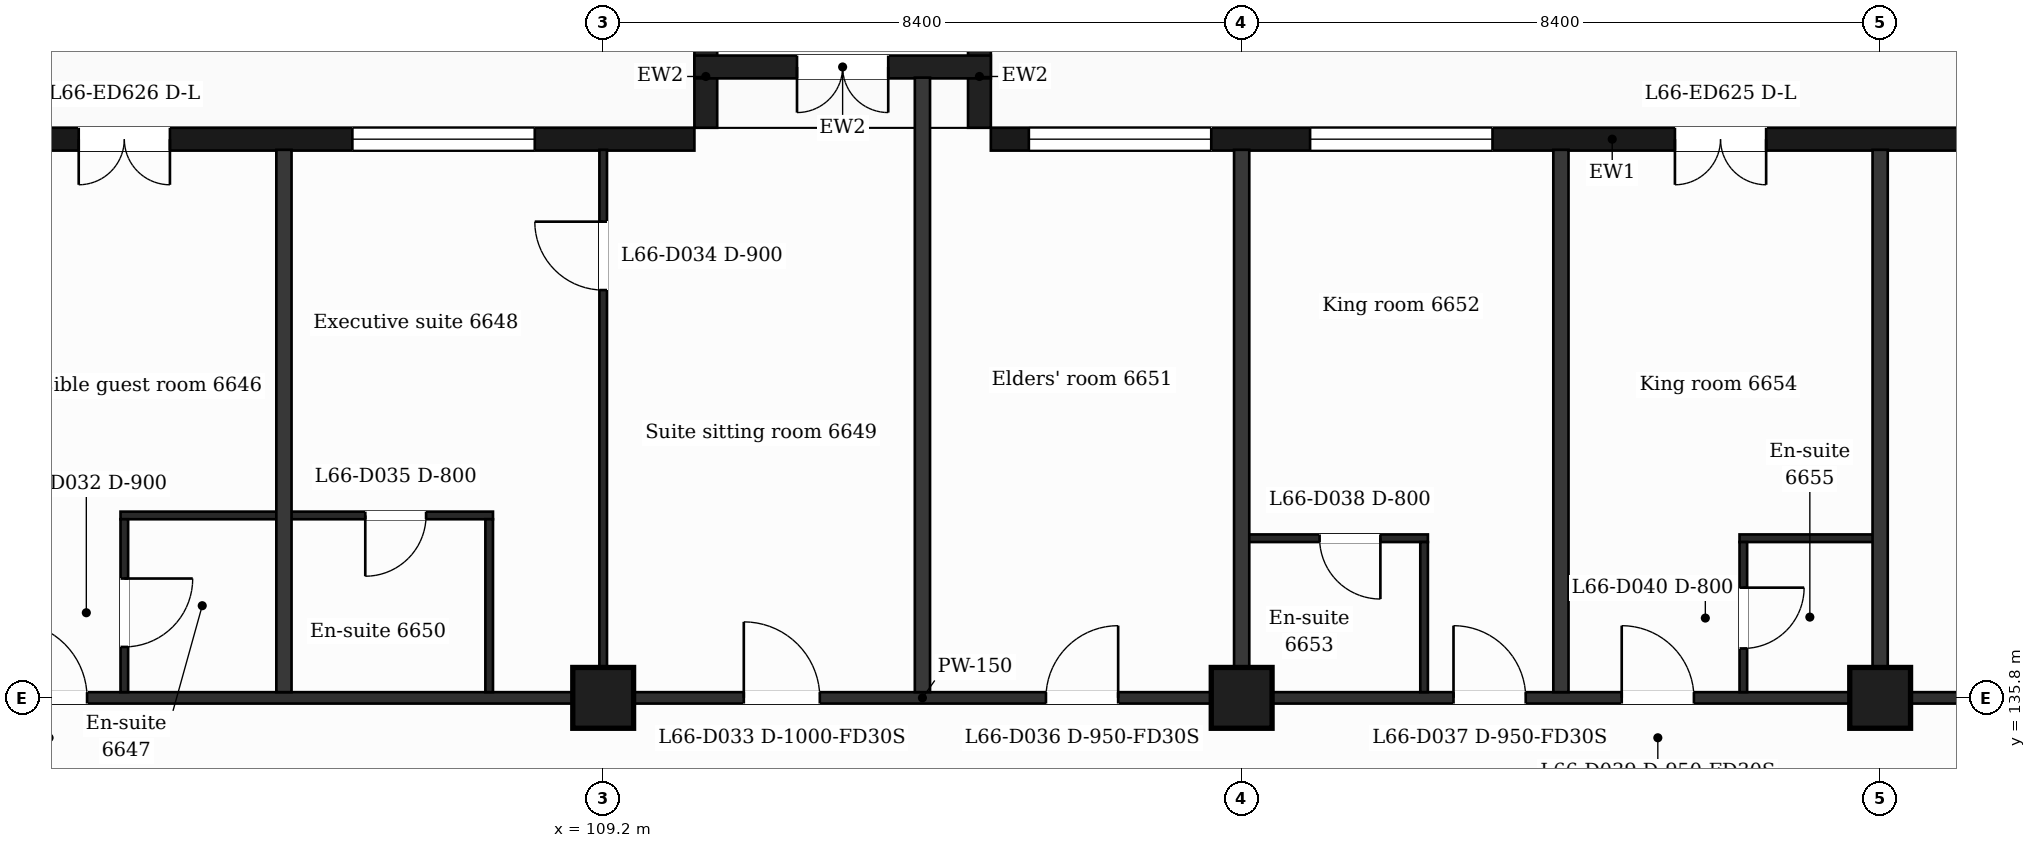
"""IFC4 building model, lengths in metres.
Left out: names, types, materials, properties, quantities, classifications, styles, units other than length and angle.
Written with IfcOpenShell. Run it as: python <this file> out.ifc"""

import sys

from ifc_helpers import new_model, si_unit, direction, frame, frame_2d, origin, origin_2d, place, context, subcontext, project, spatial, rectangle, extrude, element, fill, save


model = new_model("IFC4")
c1 = context("Model", 3, precision=1e-05, world=origin(), true_north=direction((0.0, 1.0)))
c2 = subcontext(c1, "Body", "Model", "MODEL_VIEW")
j1 = project(units=[si_unit("LENGTHUNIT", "METRE"), si_unit("PLANEANGLEUNIT", "RADIAN")], contexts=[c1])
p1 = place(None, origin())
s1 = spatial("IfcSite", under=j1, at=p1, CompositionType="ELEMENT")
p2 = place(p1, origin())
s2 = spatial("IfcBuilding", under=s1, at=p2, CompositionType="ELEMENT")
p3 = place(p2, frame((0.0, 0.0, 273.8)))
s3 = spatial("IfcBuildingStorey", under=s2, at=p3, CompositionType="ELEMENT", Elevation=273.8)
for number, where, z_axis, x_axis in (
    (1, (109.2, 135.8, 0.0), (0.0, 0.0, 1.0), (1.0, 0.0, 0.0)),
    (2, (117.6, 135.8, 0.0), (0.0, 0.0, 1.0), (1.0, 0.0, 0.0)),
    (3, (126.0, 135.8, 0.0), (0.0, 0.0, 1.0), (1.0, 0.0, 0.0)),
):
    element("IfcColumn", number, at=place(p3, frame(where, z_axis=z_axis, x_axis=x_axis)), inside=s3, PredefinedType="COLUMN", context=c2, shape_type="SweptSolid", body=[
        extrude(rectangle(XDim=0.8, YDim=0.8, at=origin_2d()), origin(), (0.0, 0.0, 1.0), 3.7),
    ])
p4 = place(p3, frame((130.65, 143.15, 0.0), z_axis=(0.0, 0.0, 1.0), x_axis=(-1.0, 0.0, 0.0)))
e4 = element("IfcWall", 4, at=p4, inside=s3, PredefinedType="SOLIDWALL", context=c2, shape_type="SweptSolid", body=[
    extrude(rectangle(XDim=16.35, YDim=0.3, at=frame_2d((8.175, 0.0))), origin(), (0.0, 0.0, 1.0), 3.38),
])
p5 = place(p4, frame((1.95, 0.0, 0.9)))
e5 = element("IfcOpeningElement", 5, at=p5, cuts=e4, PredefinedType="OPENING", context=c2, shape_type="SweptSolid", body=[
    extrude(rectangle(XDim=1.2, YDim=2.1, at=frame_2d((0.6, 1.05))), frame((0.0, 0.16, 0.0), z_axis=(0.0, -1.0, 0.0), x_axis=(1.0, 0.0, 0.0)), (0.0, 0.0, 1.0), 0.32),
])
p6 = place(p4, frame((6.15, 0.0, 0.0)))
e6 = element("IfcOpeningElement", 6, at=p6, cuts=e4, PredefinedType="OPENING", context=c2, shape_type="SweptSolid", body=[
    extrude(rectangle(XDim=1.2, YDim=2.4, at=frame_2d((0.6, 1.2))), frame((0.0, 0.16, 0.0), z_axis=(0.0, -1.0, 0.0), x_axis=(1.0, 0.0, 0.0)), (0.0, 0.0, 1.0), 0.32),
])
p7 = place(p4, frame((9.75, 0.0, 0.9)))
e7 = element("IfcOpeningElement", 7, at=p7, cuts=e4, PredefinedType="OPENING", context=c2, shape_type="SweptSolid", body=[
    extrude(rectangle(XDim=2.4, YDim=2.1, at=frame_2d((1.2, 1.05))), frame((0.0, 0.16, 0.0), z_axis=(0.0, -1.0, 0.0), x_axis=(1.0, 0.0, 0.0)), (0.0, 0.0, 1.0), 0.32),
])
p8 = place(p4, frame((13.45, 0.0, 0.9)))
e8 = element("IfcOpeningElement", 8, at=p8, cuts=e4, PredefinedType="OPENING", context=c2, shape_type="SweptSolid", body=[
    extrude(rectangle(XDim=2.4, YDim=2.1, at=frame_2d((1.2, 1.05))), frame((0.0, 0.16, 0.0), z_axis=(0.0, -1.0, 0.0), x_axis=(1.0, 0.0, 0.0)), (0.0, 0.0, 1.0), 0.32),
])
p9 = place(p3, frame((110.4, 143.15, 0.0), z_axis=(0.0, 0.0, 1.0), x_axis=(-1.0, 0.0, 0.0)))
e9 = element("IfcWall", 9, at=p9, inside=s3, PredefinedType="SOLIDWALL", context=c2, shape_type="SweptSolid", body=[
    extrude(rectangle(XDim=14.4, YDim=0.3, at=frame_2d((7.2, 0.0))), origin(), (0.0, 0.0, 1.0), 3.38),
])
p10 = place(p9, frame((2.1, 0.0, 0.9)))
e10 = element("IfcOpeningElement", 10, at=p10, cuts=e9, PredefinedType="OPENING", context=c2, shape_type="SweptSolid", body=[
    extrude(rectangle(XDim=2.4, YDim=2.1, at=frame_2d((1.2, 1.05))), frame((0.0, 0.16, 0.0), z_axis=(0.0, -1.0, 0.0), x_axis=(1.0, 0.0, 0.0)), (0.0, 0.0, 1.0), 0.32),
])
p11 = place(p9, frame((6.9, 0.0, 0.0)))
e11 = element("IfcOpeningElement", 11, at=p11, cuts=e9, PredefinedType="OPENING", context=c2, shape_type="SweptSolid", body=[
    extrude(rectangle(XDim=1.2, YDim=2.4, at=frame_2d((0.6, 1.2))), frame((0.0, 0.16, 0.0), z_axis=(0.0, -1.0, 0.0), x_axis=(1.0, 0.0, 0.0)), (0.0, 0.0, 1.0), 0.32),
])
p12 = place(p9, frame((11.1, 0.0, 0.9)))
e12 = element("IfcOpeningElement", 12, at=p12, cuts=e9, PredefinedType="OPENING", context=c2, shape_type="SweptSolid", body=[
    extrude(rectangle(XDim=1.2, YDim=2.1, at=frame_2d((0.6, 1.05))), frame((0.0, 0.16, 0.0), z_axis=(0.0, -1.0, 0.0), x_axis=(1.0, 0.0, 0.0)), (0.0, 0.0, 1.0), 0.32),
])
for number, where, z_axis, x_axis in (
    (13, (114.15, 143.3, 0.0), (0.0, 0.0, 1.0), (0.0, 1.0, 0.0)),
    (14, (110.55, 143.3, 0.0), (0.0, 0.0, 1.0), (0.0, 1.0, 0.0)),
):
    element("IfcWall", number, at=place(p3, frame(where, z_axis=z_axis, x_axis=x_axis)), inside=s3, PredefinedType="SOLIDWALL", context=c2, shape_type="SweptSolid", body=[
        extrude(rectangle(XDim=1.35, YDim=0.3, at=frame_2d((0.675, 0.0))), origin(), (0.0, 0.0, 1.0), 3.38),
    ])
p13 = place(p3, frame((114.3, 144.1, 0.0), z_axis=(0.0, 0.0, 1.0), x_axis=(-1.0, 0.0, 0.0)))
e15 = element("IfcWall", 15, at=p13, inside=s3, PredefinedType="SOLIDWALL", context=c2, shape_type="SweptSolid", body=[
    extrude(rectangle(XDim=3.9, YDim=0.3, at=frame_2d((1.95, 0.0))), origin(), (0.0, 0.0, 1.0), 3.38),
])
p14 = place(p13, frame((1.35, 0.0, 0.0)))
e16 = element("IfcOpeningElement", 16, at=p14, cuts=e15, PredefinedType="OPENING", context=c2, shape_type="SweptSolid", body=[
    extrude(rectangle(XDim=1.2, YDim=2.4, at=frame_2d((0.6, 1.2))), frame((0.0, 0.16, 0.0), z_axis=(0.0, -1.0, 0.0), x_axis=(1.0, 0.0, 0.0)), (0.0, 0.0, 1.0), 0.32),
])
p15 = place(p3, frame((90.895, 135.8, 0.0), z_axis=(0.0, 0.0, 1.0), x_axis=(1.0, 0.0, 0.0)))
e17 = element("IfcWall", 17, at=p15, inside=s3, PredefinedType="PARTITIONING", context=c2, shape_type="SweptSolid", body=[
    extrude(rectangle(XDim=45.011, YDim=0.15, at=frame_2d((22.505, 0.0))), origin(), (0.0, 0.0, 1.0), 3.38),
])
p16 = place(p15, frame((8.005, 0.0, 0.0)))
e18 = element("IfcOpeningElement", 18, at=p16, cuts=e17, PredefinedType="OPENING", context=c2, shape_type="SweptSolid", body=[
    extrude(rectangle(XDim=1.0, YDim=2.1, at=frame_2d((0.5, 1.05))), frame((0.0, 0.085, 0.0), z_axis=(0.0, -1.0, 0.0), x_axis=(1.0, 0.0, 0.0)), (0.0, 0.0, 1.0), 0.17),
])
p17 = place(p15, frame((10.515, 0.0, 0.0)))
e19 = element("IfcOpeningElement", 19, at=p17, cuts=e17, PredefinedType="OPENING", context=c2, shape_type="SweptSolid", body=[
    extrude(rectangle(XDim=1.0, YDim=2.1, at=frame_2d((0.5, 1.05))), frame((0.0, 0.085, 0.0), z_axis=(0.0, -1.0, 0.0), x_axis=(1.0, 0.0, 0.0)), (0.0, 0.0, 1.0), 0.17),
])
p18 = place(p15, frame((20.156, 0.0, 0.0)))
e20 = element("IfcOpeningElement", 20, at=p18, cuts=e17, PredefinedType="OPENING", context=c2, shape_type="SweptSolid", body=[
    extrude(rectangle(XDim=1.0, YDim=2.1, at=frame_2d((0.5, 1.05))), frame((0.0, 0.085, 0.0), z_axis=(0.0, -1.0, 0.0), x_axis=(1.0, 0.0, 0.0)), (0.0, 0.0, 1.0), 0.17),
])
p19 = place(p15, frame((24.13, 0.0, 0.0)))
e21 = element("IfcOpeningElement", 21, at=p19, cuts=e17, PredefinedType="OPENING", context=c2, shape_type="SweptSolid", body=[
    extrude(rectangle(XDim=0.95, YDim=2.1, at=frame_2d((0.475, 1.05))), frame((0.0, 0.085, 0.0), z_axis=(0.0, -1.0, 0.0), x_axis=(1.0, 0.0, 0.0)), (0.0, 0.0, 1.0), 0.17),
])
p20 = place(p15, frame((29.492, 0.0, 0.0)))
e22 = element("IfcOpeningElement", 22, at=p20, cuts=e17, PredefinedType="OPENING", context=c2, shape_type="SweptSolid", body=[
    extrude(rectangle(XDim=0.95, YDim=2.1, at=frame_2d((0.475, 1.05))), frame((0.0, 0.085, 0.0), z_axis=(0.0, -1.0, 0.0), x_axis=(1.0, 0.0, 0.0)), (0.0, 0.0, 1.0), 0.17),
])
p21 = place(p15, frame((31.705, 0.0, 0.0)))
e23 = element("IfcOpeningElement", 23, at=p21, cuts=e17, PredefinedType="OPENING", context=c2, shape_type="SweptSolid", body=[
    extrude(rectangle(XDim=0.95, YDim=2.1, at=frame_2d((0.475, 1.05))), frame((0.0, 0.085, 0.0), z_axis=(0.0, -1.0, 0.0), x_axis=(1.0, 0.0, 0.0)), (0.0, 0.0, 1.0), 0.17),
])
p22 = place(p15, frame((39.814, 0.0, 0.0)))
e24 = element("IfcOpeningElement", 24, at=p22, cuts=e17, PredefinedType="OPENING", context=c2, shape_type="SweptSolid", body=[
    extrude(rectangle(XDim=0.95, YDim=2.1, at=frame_2d((0.475, 1.05))), frame((0.0, 0.085, 0.0), z_axis=(0.0, -1.0, 0.0), x_axis=(1.0, 0.0, 0.0)), (0.0, 0.0, 1.0), 0.17),
])
p23 = place(p3, frame((117.6, 137.9, 0.0), z_axis=(0.0, 0.0, 1.0), x_axis=(1.0, 0.0, 0.0)))
e25 = element("IfcWall", 25, at=p23, inside=s3, PredefinedType="PARTITIONING", context=c2, shape_type="SweptSolid", body=[
    extrude(rectangle(XDim=2.45, YDim=0.1, at=frame_2d((1.225, 0.0))), origin(), (0.0, 0.0, 1.0), 3.38),
])
p24 = place(p23, frame((1.025, 0.0, 0.0)))
e26 = element("IfcOpeningElement", 26, at=p24, cuts=e25, PredefinedType="OPENING", context=c2, shape_type="SweptSolid", body=[
    extrude(rectangle(XDim=0.8, YDim=2.1, at=frame_2d((0.4, 1.05))), frame((0.0, 0.06, 0.0), z_axis=(0.0, -1.0, 0.0), x_axis=(1.0, 0.0, 0.0)), (0.0, 0.0, 1.0), 0.12),
])
p25 = place(p3, frame((124.15, 137.9, 0.0), z_axis=(0.0, 0.0, 1.0), x_axis=(1.0, 0.0, 0.0)))
e27 = element("IfcWall", 27, at=p25, inside=s3, PredefinedType="PARTITIONING", context=c2, shape_type="SweptSolid", body=[
    extrude(rectangle(XDim=1.85, YDim=0.1, at=frame_2d((0.925, 0.0))), origin(), (0.0, 0.0, 1.0), 3.38),
])
p26 = place(p3, frame((102.85, 138.2, 0.0), z_axis=(0.0, 0.0, 1.0), x_axis=(1.0, 0.0, 0.0)))
e28 = element("IfcWall", 28, at=p26, inside=s3, PredefinedType="PARTITIONING", context=c2, shape_type="SweptSolid", body=[
    extrude(rectangle(XDim=4.9, YDim=0.1, at=frame_2d((2.45, 0.0))), origin(), (0.0, 0.0, 1.0), 3.38),
])
p27 = place(p26, frame((3.22, 0.0, 0.0)))
e29 = element("IfcOpeningElement", 29, at=p27, cuts=e28, PredefinedType="OPENING", context=c2, shape_type="SweptSolid", body=[
    extrude(rectangle(XDim=0.8, YDim=2.1, at=frame_2d((0.4, 1.05))), frame((0.0, 0.06, 0.0), z_axis=(0.0, -1.0, 0.0), x_axis=(1.0, 0.0, 0.0)), (0.0, 0.0, 1.0), 0.12),
])
p28 = place(p3, frame((102.9, 135.875, 0.0), z_axis=(0.0, 0.0, 1.0), x_axis=(0.0, 1.0, 0.0)))
e30 = element("IfcWall", 30, at=p28, inside=s3, PredefinedType="PARTITIONING", context=c2, shape_type="SweptSolid", body=[
    extrude(rectangle(XDim=2.275, YDim=0.1, at=frame_2d((1.137, 0.0))), origin(), (0.0, 0.0, 1.0), 3.38),
])
p29 = place(p28, frame((0.595, 0.0, 0.0)))
e31 = element("IfcOpeningElement", 31, at=p29, cuts=e30, PredefinedType="OPENING", context=c2, shape_type="SweptSolid", body=[
    extrude(rectangle(XDim=0.9, YDim=2.1, at=frame_2d((0.45, 1.05))), frame((0.0, 0.06, 0.0), z_axis=(0.0, -1.0, 0.0), x_axis=(1.0, 0.0, 0.0)), (0.0, 0.0, 1.0), 0.12),
])
p30 = place(p3, frame((105.0, 135.875, 0.0), z_axis=(0.0, 0.0, 1.0), x_axis=(0.0, 1.0, 0.0)))
e32 = element("IfcWall", 32, at=p30, inside=s3, PredefinedType="PARTITIONING", context=c2, shape_type="SweptSolid", body=[
    extrude(rectangle(XDim=7.135, YDim=0.2, at=frame_2d((3.567, 0.0))), origin(), (0.0, 0.0, 1.0), 3.38),
])
p31 = place(p3, frame((107.7, 135.875, 0.0), z_axis=(0.0, 0.0, 1.0), x_axis=(0.0, 1.0, 0.0)))
e33 = element("IfcWall", 33, at=p31, inside=s3, PredefinedType="PARTITIONING", context=c2, shape_type="SweptSolid", body=[
    extrude(rectangle(XDim=2.275, YDim=0.1, at=frame_2d((1.137, 0.0))), origin(), (0.0, 0.0, 1.0), 3.38),
])
p32 = place(p3, frame((109.2, 135.875, 0.0), z_axis=(0.0, 0.0, 1.0), x_axis=(0.0, 1.0, 0.0)))
e34 = element("IfcWall", 34, at=p32, inside=s3, PredefinedType="PARTITIONING", context=c2, shape_type="SweptSolid", body=[
    extrude(rectangle(XDim=7.135, YDim=0.1, at=frame_2d((3.567, 0.0))), origin(), (0.0, 0.0, 1.0), 3.38),
])
p33 = place(p32, frame((5.29, 0.0, 0.0)))
e35 = element("IfcOpeningElement", 35, at=p33, cuts=e34, PredefinedType="OPENING", context=c2, shape_type="SweptSolid", body=[
    extrude(rectangle(XDim=0.9, YDim=2.1, at=frame_2d((0.45, 1.05))), frame((0.0, 0.06, 0.0), z_axis=(0.0, -1.0, 0.0), x_axis=(1.0, 0.0, 0.0)), (0.0, 0.0, 1.0), 0.12),
])
p34 = place(p3, frame((113.4, 135.875, 0.0), z_axis=(0.0, 0.0, 1.0), x_axis=(0.0, 1.0, 0.0)))
e36 = element("IfcWall", 36, at=p34, inside=s3, PredefinedType="PARTITIONING", context=c2, shape_type="SweptSolid", body=[
    extrude(rectangle(XDim=8.085, YDim=0.2, at=frame_2d((4.042, 0.0))), origin(), (0.0, 0.0, 1.0), 3.38),
])
p35 = place(p3, frame((117.6, 135.875, 0.0), z_axis=(0.0, 0.0, 1.0), x_axis=(0.0, 1.0, 0.0)))
e37 = element("IfcWall", 37, at=p35, inside=s3, PredefinedType="PARTITIONING", context=c2, shape_type="SweptSolid", body=[
    extrude(rectangle(XDim=7.135, YDim=0.2, at=frame_2d((3.567, 0.0))), origin(), (0.0, 0.0, 1.0), 3.38),
])
p36 = place(p3, frame((120.0, 135.875, 0.0), z_axis=(0.0, 0.0, 1.0), x_axis=(0.0, 1.0, 0.0)))
e38 = element("IfcWall", 38, at=p36, inside=s3, PredefinedType="PARTITIONING", context=c2, shape_type="SweptSolid", body=[
    extrude(rectangle(XDim=1.975, YDim=0.1, at=frame_2d((0.988, 0.0))), origin(), (0.0, 0.0, 1.0), 3.38),
])
p37 = place(p3, frame((121.8, 135.875, 0.0), z_axis=(0.0, 0.0, 1.0), x_axis=(0.0, 1.0, 0.0)))
e39 = element("IfcWall", 39, at=p37, inside=s3, PredefinedType="PARTITIONING", context=c2, shape_type="SweptSolid", body=[
    extrude(rectangle(XDim=7.135, YDim=0.2, at=frame_2d((3.567, 0.0))), origin(), (0.0, 0.0, 1.0), 3.38),
])
p38 = place(p3, frame((124.2, 135.875, 0.0), z_axis=(0.0, 0.0, 1.0), x_axis=(0.0, 1.0, 0.0)))
e40 = element("IfcWall", 40, at=p38, inside=s3, PredefinedType="PARTITIONING", context=c2, shape_type="SweptSolid", body=[
    extrude(rectangle(XDim=1.975, YDim=0.1, at=frame_2d((0.988, 0.0))), origin(), (0.0, 0.0, 1.0), 3.38),
])
p39 = place(p38, frame((0.575, 0.0, 0.0)))
e41 = element("IfcOpeningElement", 41, at=p39, cuts=e40, PredefinedType="OPENING", context=c2, shape_type="SweptSolid", body=[
    extrude(rectangle(XDim=0.8, YDim=2.1, at=frame_2d((0.4, 1.05))), frame((0.0, 0.06, 0.0), z_axis=(0.0, -1.0, 0.0), x_axis=(1.0, 0.0, 0.0)), (0.0, 0.0, 1.0), 0.12),
])
p40 = place(p3, frame((126.0, 135.875, 0.0), z_axis=(0.0, 0.0, 1.0), x_axis=(0.0, 1.0, 0.0)))
e42 = element("IfcWall", 42, at=p40, inside=s3, PredefinedType="PARTITIONING", context=c2, shape_type="SweptSolid", body=[
    extrude(rectangle(XDim=7.135, YDim=0.2, at=frame_2d((3.567, 0.0))), origin(), (0.0, 0.0, 1.0), 3.38),
])
p41 = place(p6, origin())
e43 = element("IfcDoor", 43, at=p41, inside=s3, OperationType="DOUBLE_DOOR_SINGLE_SWING", PredefinedType="DOOR", context=c2, shape_type="SweptSolid", body=[
    extrude(rectangle(XDim=1.2, YDim=2.4, at=frame_2d((0.6, 1.2))), frame((0.0, 0.025, 0.0), z_axis=(0.0, -1.0, 0.0), x_axis=(1.0, 0.0, 0.0)), (0.0, 0.0, 1.0), 0.05),
])
fill(e6, e43)
p42 = place(p7, origin())
e44 = element("IfcWindow", 44, at=p42, inside=s3, PartitioningType="SINGLE_PANEL", PredefinedType="WINDOW", context=c2, shape_type="SweptSolid", body=[
    extrude(rectangle(XDim=2.4, YDim=2.1, at=frame_2d((1.2, 1.05))), frame((0.0, 0.03, 0.0), z_axis=(0.0, -1.0, 0.0), x_axis=(1.0, 0.0, 0.0)), (0.0, 0.0, 1.0), 0.06),
])
fill(e7, e44)
p43 = place(p8, origin())
e45 = element("IfcWindow", 45, at=p43, inside=s3, PartitioningType="SINGLE_PANEL", PredefinedType="WINDOW", context=c2, shape_type="SweptSolid", body=[
    extrude(rectangle(XDim=2.4, YDim=2.1, at=frame_2d((1.2, 1.05))), frame((0.0, 0.03, 0.0), z_axis=(0.0, -1.0, 0.0), x_axis=(1.0, 0.0, 0.0)), (0.0, 0.0, 1.0), 0.06),
])
fill(e8, e45)
p44 = place(p10, origin())
e46 = element("IfcWindow", 46, at=p44, inside=s3, PartitioningType="SINGLE_PANEL", PredefinedType="WINDOW", context=c2, shape_type="SweptSolid", body=[
    extrude(rectangle(XDim=2.4, YDim=2.1, at=frame_2d((1.2, 1.05))), frame((0.0, 0.03, 0.0), z_axis=(0.0, -1.0, 0.0), x_axis=(1.0, 0.0, 0.0)), (0.0, 0.0, 1.0), 0.06),
])
fill(e10, e46)
p45 = place(p11, origin())
e47 = element("IfcDoor", 47, at=p45, inside=s3, OperationType="DOUBLE_DOOR_SINGLE_SWING", PredefinedType="DOOR", context=c2, shape_type="SweptSolid", body=[
    extrude(rectangle(XDim=1.2, YDim=2.4, at=frame_2d((0.6, 1.2))), frame((0.0, 0.025, 0.0), z_axis=(0.0, -1.0, 0.0), x_axis=(1.0, 0.0, 0.0)), (0.0, 0.0, 1.0), 0.05),
])
fill(e11, e47)
p46 = place(p14, origin())
e48 = element("IfcDoor", 48, at=p46, inside=s3, OperationType="DOUBLE_DOOR_SINGLE_SWING", PredefinedType="DOOR", context=c2, shape_type="SweptSolid", body=[
    extrude(rectangle(XDim=1.2, YDim=2.4, at=frame_2d((0.6, 1.2))), frame((0.0, 0.025, 0.0), z_axis=(0.0, -1.0, 0.0), x_axis=(1.0, 0.0, 0.0)), (0.0, 0.0, 1.0), 0.05),
])
fill(e16, e48)
p47 = place(p17, origin())
e49 = element("IfcDoor", 49, at=p47, inside=s3, OperationType="SINGLE_SWING_LEFT", PredefinedType="DOOR", context=c2, shape_type="SweptSolid", body=[
    extrude(rectangle(XDim=1.0, YDim=2.1, at=frame_2d((0.5, 1.05))), frame((0.0, 0.025, 0.0), z_axis=(0.0, -1.0, 0.0), x_axis=(1.0, 0.0, 0.0)), (0.0, 0.0, 1.0), 0.05),
])
fill(e19, e49)
p48 = place(p29, origin())
e50 = element("IfcDoor", 50, at=p48, inside=s3, OperationType="SINGLE_SWING_RIGHT", PredefinedType="DOOR", context=c2, shape_type="SweptSolid", body=[
    extrude(rectangle(XDim=0.9, YDim=2.1, at=frame_2d((0.45, 1.05))), frame((0.0, 0.025, 0.0), z_axis=(0.0, -1.0, 0.0), x_axis=(1.0, 0.0, 0.0)), (0.0, 0.0, 1.0), 0.05),
])
fill(e31, e50)
p49 = place(p18, origin())
e51 = element("IfcDoor", 51, at=p49, inside=s3, OperationType="SINGLE_SWING_LEFT", PredefinedType="DOOR", context=c2, shape_type="SweptSolid", body=[
    extrude(rectangle(XDim=1.0, YDim=2.1, at=frame_2d((0.5, 1.05))), frame((0.0, 0.025, 0.0), z_axis=(0.0, -1.0, 0.0), x_axis=(1.0, 0.0, 0.0)), (0.0, 0.0, 1.0), 0.05),
])
fill(e20, e51)
p50 = place(p33, origin())
e52 = element("IfcDoor", 52, at=p50, inside=s3, OperationType="SINGLE_SWING_RIGHT", PredefinedType="DOOR", context=c2, shape_type="SweptSolid", body=[
    extrude(rectangle(XDim=0.9, YDim=2.1, at=frame_2d((0.45, 1.05))), frame((0.0, 0.025, 0.0), z_axis=(0.0, -1.0, 0.0), x_axis=(1.0, 0.0, 0.0)), (0.0, 0.0, 1.0), 0.05),
])
fill(e35, e52)
p51 = place(p27, origin())
e53 = element("IfcDoor", 53, at=p51, inside=s3, OperationType="SINGLE_SWING_LEFT", PredefinedType="DOOR", context=c2, shape_type="SweptSolid", body=[
    extrude(rectangle(XDim=0.8, YDim=2.1, at=frame_2d((0.4, 1.05))), frame((0.0, 0.025, 0.0), z_axis=(0.0, -1.0, 0.0), x_axis=(1.0, 0.0, 0.0)), (0.0, 0.0, 1.0), 0.05),
])
fill(e29, e53)
p52 = place(p19, origin())
e54 = element("IfcDoor", 54, at=p52, inside=s3, OperationType="SINGLE_SWING_RIGHT", PredefinedType="DOOR", context=c2, shape_type="SweptSolid", body=[
    extrude(rectangle(XDim=0.95, YDim=2.1, at=frame_2d((0.475, 1.05))), frame((0.0, 0.025, 0.0), z_axis=(0.0, -1.0, 0.0), x_axis=(1.0, 0.0, 0.0)), (0.0, 0.0, 1.0), 0.05),
])
fill(e21, e54)
p53 = place(p20, origin())
e55 = element("IfcDoor", 55, at=p53, inside=s3, OperationType="SINGLE_SWING_LEFT", PredefinedType="DOOR", context=c2, shape_type="SweptSolid", body=[
    extrude(rectangle(XDim=0.95, YDim=2.1, at=frame_2d((0.475, 1.05))), frame((0.0, 0.025, 0.0), z_axis=(0.0, -1.0, 0.0), x_axis=(1.0, 0.0, 0.0)), (0.0, 0.0, 1.0), 0.05),
])
fill(e22, e55)
p54 = place(p24, origin())
e56 = element("IfcDoor", 56, at=p54, inside=s3, OperationType="SINGLE_SWING_RIGHT", PredefinedType="DOOR", context=c2, shape_type="SweptSolid", body=[
    extrude(rectangle(XDim=0.8, YDim=2.1, at=frame_2d((0.4, 1.05))), frame((0.0, 0.025, 0.0), z_axis=(0.0, -1.0, 0.0), x_axis=(1.0, 0.0, 0.0)), (0.0, 0.0, 1.0), 0.05),
])
fill(e26, e56)
p55 = place(p21, origin())
e57 = element("IfcDoor", 57, at=p55, inside=s3, OperationType="SINGLE_SWING_LEFT", PredefinedType="DOOR", context=c2, shape_type="SweptSolid", body=[
    extrude(rectangle(XDim=0.95, YDim=2.1, at=frame_2d((0.475, 1.05))), frame((0.0, 0.025, 0.0), z_axis=(0.0, -1.0, 0.0), x_axis=(1.0, 0.0, 0.0)), (0.0, 0.0, 1.0), 0.05),
])
fill(e23, e57)
p56 = place(p39, origin())
e58 = element("IfcDoor", 58, at=p56, inside=s3, OperationType="SINGLE_SWING_RIGHT", PredefinedType="DOOR", context=c2, shape_type="SweptSolid", body=[
    extrude(rectangle(XDim=0.8, YDim=2.1, at=frame_2d((0.4, 1.05))), frame((0.0, 0.025, 0.0), z_axis=(0.0, -1.0, 0.0), x_axis=(1.0, 0.0, 0.0)), (0.0, 0.0, 1.0), 0.05),
])
fill(e41, e58)
save(model, sys.argv[1])
